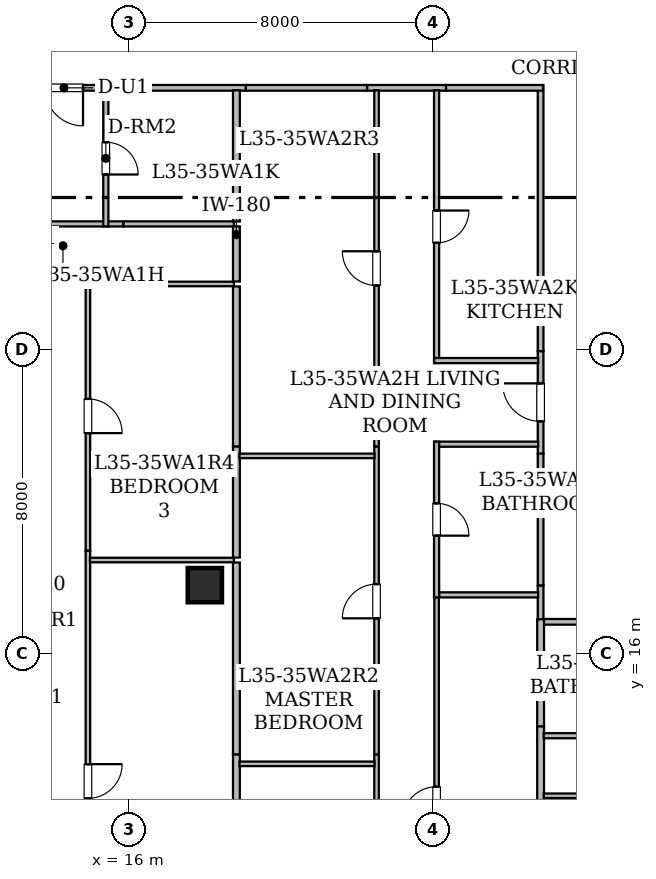
"""IFC4 building model, lengths in metres.
Left out: names, types, materials, properties, quantities, classifications, styles, units other than length and angle.
Written with IfcOpenShell. Run it as: python <this file> out.ifc"""

import sys

from ifc_helpers import new_model, si_unit, direction, frame, frame_2d, origin, origin_2d, place, context, subcontext, project, spatial, rectangle, hollow_rectangle, extrude, element, fill, save


model = new_model("IFC4")
c1 = context("Model", 3, precision=1e-05, world=origin(), true_north=direction((0.0, 1.0)))
c2 = subcontext(c1, "Body", "Model", "MODEL_VIEW")
j1 = project(units=[si_unit("LENGTHUNIT", "METRE"), si_unit("PLANEANGLEUNIT", "RADIAN")], contexts=[c1])
p1 = place(None, origin())
s1 = spatial("IfcSite", under=j1, at=p1, CompositionType="ELEMENT")
p2 = place(p1, origin())
s2 = spatial("IfcBuilding", under=s1, at=p2, CompositionType="ELEMENT")
p3 = place(p2, frame((0.0, 0.0, 138.4)))
s3 = spatial("IfcBuildingStorey", under=s2, at=p3, CompositionType="ELEMENT", Elevation=138.4)
p4 = place(p3, frame((18.0, 17.8, 0.0), z_axis=(0.0, 0.0, 1.0), x_axis=(1.0, 0.0, 0.0)))
e1 = element("IfcColumn", 1, at=p4, inside=s3, PredefinedType="COLUMN", context=c2, shape_type="SweptSolid", body=[
    extrude(hollow_rectangle(XDim=0.9, YDim=0.9, WallThickness=0.045, at=origin_2d()), origin(), (0.0, 0.0, 1.0), 3.65),
])
p5 = place(p3, frame((15.643, 30.885, 0.0), z_axis=(0.0, 0.0, 1.0), x_axis=(-1.0, 0.0, 0.0)))
e2 = element("IfcWall", 2, at=p5, inside=s3, PredefinedType="STANDARD", context=c2, shape_type="SweptSolid", body=[
    extrude(rectangle(XDim=2.698, YDim=0.15, at=frame_2d((1.349, 0.0))), origin(), (0.0, 0.0, 1.0), 3.43),
])
p6 = place(p5, frame((0.849, 0.0, 0.0)))
e3 = element("IfcOpeningElement", 3, at=p6, cuts=e2, PredefinedType="OPENING", context=c2, shape_type="SweptSolid", body=[
    extrude(rectangle(XDim=1.0, YDim=2.15, at=frame_2d((0.5, 1.075))), frame((0.0, 0.085, 0.0), z_axis=(0.0, -1.0, 0.0), x_axis=(1.0, 0.0, 0.0)), (0.0, 0.0, 1.0), 0.17),
])
p7 = place(p3, frame((19.08, 30.885, 0.0), z_axis=(0.0, 0.0, 1.0), x_axis=(-1.0, 0.0, 0.0)))
e4 = element("IfcWall", 4, at=p7, inside=s3, PredefinedType="STANDARD", context=c2, shape_type="SweptSolid", body=[
    extrude(rectangle(XDim=3.437, YDim=0.15, at=frame_2d((1.719, 0.0))), origin(), (0.0, 0.0, 1.0), 2.647),
])
p8 = place(p3, frame((26.835, 16.9, 0.0), z_axis=(0.0, 0.0, 1.0), x_axis=(0.0, 1.0, 0.0)))
e5 = element("IfcWall", 5, at=p8, inside=s3, PredefinedType="STANDARD", context=c2, shape_type="SweptSolid", body=[
    extrude(rectangle(XDim=0.893, YDim=0.15, at=frame_2d((0.447, 0.0))), origin(), (0.0, 0.0, 1.0), 3.43),
])
p9 = place(p3, frame((26.835, 21.26, 0.0), z_axis=(0.0, 0.0, 1.0), x_axis=(0.0, 1.0, 0.0)))
e6 = element("IfcWall", 6, at=p9, inside=s3, PredefinedType="STANDARD", context=c2, shape_type="SweptSolid", body=[
    extrude(rectangle(XDim=2.698, YDim=0.15, at=frame_2d((1.349, 0.0))), origin(), (0.0, 0.0, 1.0), 3.43),
])
p10 = place(p9, frame((0.849, 0.0, 0.0)))
e7 = element("IfcOpeningElement", 7, at=p10, cuts=e6, PredefinedType="OPENING", context=c2, shape_type="SweptSolid", body=[
    extrude(rectangle(XDim=1.0, YDim=2.15, at=frame_2d((0.5, 1.075))), frame((0.0, 0.085, 0.0), z_axis=(0.0, -1.0, 0.0), x_axis=(1.0, 0.0, 0.0)), (0.0, 0.0, 1.0), 0.17),
])
p11 = place(p3, frame((24.347, 30.885, 0.0), z_axis=(0.0, 0.0, 1.0), x_axis=(-1.0, 0.0, 0.0)))
e8 = element("IfcWall", 8, at=p11, inside=s3, PredefinedType="STANDARD", context=c2, shape_type="SweptSolid", body=[
    extrude(rectangle(XDim=2.079, YDim=0.15, at=frame_2d((1.04, 0.0))), origin(), (0.0, 0.0, 1.0), 3.43),
])
p12 = place(p3, frame((26.835, 17.793, 0.0), z_axis=(0.0, 0.0, 1.0), x_axis=(0.0, 1.0, 0.0)))
e9 = element("IfcWall", 9, at=p12, inside=s3, PredefinedType="STANDARD", context=c2, shape_type="SweptSolid", body=[
    extrude(rectangle(XDim=3.467, YDim=0.15, at=frame_2d((1.733, 0.0))), origin(), (0.0, 0.0, 1.0), 2.647),
])
p13 = place(p3, frame((26.835, 23.958, 0.0), z_axis=(0.0, 0.0, 1.0), x_axis=(0.0, 1.0, 0.0)))
e10 = element("IfcWall", 10, at=p13, inside=s3, PredefinedType="STANDARD", context=c2, shape_type="SweptSolid", body=[
    extrude(rectangle(XDim=6.992, YDim=0.15, at=frame_2d((3.496, 0.0))), origin(), (0.0, 0.0, 1.0), 3.013),
])
p14 = place(p3, frame((26.898, 30.885, 0.0), z_axis=(0.0, 0.0, 1.0), x_axis=(-1.0, 0.0, 0.0)))
e11 = element("IfcWall", 11, at=p14, inside=s3, PredefinedType="STANDARD", context=c2, shape_type="SweptSolid", body=[
    extrude(rectangle(XDim=2.551, YDim=0.15, at=frame_2d((1.275, 0.0))), origin(), (0.0, 0.0, 1.0), 3.43),
])
p15 = place(p3, frame((22.268, 30.885, 0.0), z_axis=(0.0, 0.0, 1.0), x_axis=(-1.0, 0.0, 0.0)))
e12 = element("IfcWall", 12, at=p15, inside=s3, PredefinedType="STANDARD", context=c2, shape_type="SweptSolid", body=[
    extrude(rectangle(XDim=3.188, YDim=0.15, at=frame_2d((1.594, 0.0))), origin(), (0.0, 0.0, 1.0), 3.43),
])
p16 = place(p3, frame((31.601, 16.835, 0.0), z_axis=(0.0, 0.0, 1.0), x_axis=(-1.0, 0.0, 0.0)))
e13 = element("IfcWall", 13, at=p16, inside=s3, PredefinedType="STANDARD", context=c2, shape_type="SweptSolid", body=[
    extrude(rectangle(XDim=4.701, YDim=0.15, at=frame_2d((2.351, 0.0))), origin(), (0.0, 0.0, 1.0), 2.647),
])
p17 = place(p3, frame((11.429, 27.305, 0.0), z_axis=(0.0, 0.0, 1.0), x_axis=(1.0, 0.0, 0.0)))
e14 = element("IfcWall", 14, at=p17, inside=s3, PredefinedType="PARTITIONING", context=c2, shape_type="SweptSolid", body=[
    extrude(rectangle(XDim=4.43, YDim=0.135, at=frame_2d((2.215, 0.0))), origin(), (0.0, 0.0, 1.0), 2.876),
])
p18 = place(p3, frame((15.394, 30.82, 0.0), z_axis=(0.0, 0.0, 1.0), x_axis=(0.0, -1.0, 0.0)))
e15 = element("IfcWall", 15, at=p18, inside=s3, PredefinedType="PARTITIONING", context=c2, shape_type="SweptSolid", body=[
    extrude(rectangle(XDim=3.58, YDim=0.135, at=frame_2d((1.79, 0.0))), origin(), (0.0, 0.0, 1.0), 3.43),
])
p19 = place(p18, frame((1.365, 0.0, 0.0)))
e16 = element("IfcOpeningElement", 16, at=p19, cuts=e15, PredefinedType="OPENING", context=c2, shape_type="SweptSolid", body=[
    extrude(rectangle(XDim=0.85, YDim=2.1, at=frame_2d((0.425, 1.05))), frame((0.0, 0.077, 0.0), z_axis=(0.0, -1.0, 0.0), x_axis=(1.0, 0.0, 0.0)), (0.0, 0.0, 1.0), 0.155),
])
p20 = place(p3, frame((15.859, 27.305, 0.0), z_axis=(0.0, 0.0, 1.0), x_axis=(1.0, 0.0, 0.0)))
e17 = element("IfcWall", 17, at=p20, inside=s3, PredefinedType="PARTITIONING", context=c2, shape_type="SweptSolid", body=[
    extrude(rectangle(XDim=2.906, YDim=0.135, at=frame_2d((1.453, 0.0))), origin(), (0.0, 0.0, 1.0), 2.647),
])
p21 = place(p3, frame((14.923, 18.71, 0.0), z_axis=(0.0, 0.0, 1.0), x_axis=(0.0, -1.0, 0.0)))
e18 = element("IfcWall", 18, at=p21, inside=s3, PredefinedType="PARTITIONING", context=c2, shape_type="SweptSolid", body=[
    extrude(rectangle(XDim=12.098, YDim=0.12, at=frame_2d((6.049, 0.0))), origin(), (0.0, 0.0, 1.0), 2.647),
])
p22 = place(p21, frame((5.62, 0.0, 0.0)))
e19 = element("IfcOpeningElement", 19, at=p22, cuts=e18, PredefinedType="OPENING", context=c2, shape_type="SweptSolid", body=[
    extrude(rectangle(XDim=0.9, YDim=2.1, at=frame_2d((0.45, 1.05))), frame((0.0, 0.07, 0.0), z_axis=(0.0, -1.0, 0.0), x_axis=(1.0, 0.0, 0.0)), (0.0, 0.0, 1.0), 0.14),
])
p23 = place(p3, frame((18.765, 25.725, 0.0), z_axis=(0.0, 0.0, 1.0), x_axis=(-1.0, 0.0, 0.0)))
e20 = element("IfcWall", 20, at=p23, inside=s3, PredefinedType="PARTITIONING", context=c2, shape_type="SweptSolid", body=[
    extrude(rectangle(XDim=3.907, YDim=0.12, at=frame_2d((1.954, 0.0))), origin(), (0.0, 0.0, 1.0), 2.647),
])
p24 = place(p3, frame((14.923, 25.79, 0.0), z_axis=(0.0, 0.0, 1.0), x_axis=(0.0, -1.0, 0.0)))
e21 = element("IfcWall", 21, at=p24, inside=s3, PredefinedType="PARTITIONING", context=c2, shape_type="SweptSolid", body=[
    extrude(rectangle(XDim=7.08, YDim=0.12, at=frame_2d((3.54, 0.0))), origin(), (0.0, 0.0, 1.0), 3.43),
])
p25 = place(p24, frame((3.09, 0.0, 0.0)))
e22 = element("IfcOpeningElement", 22, at=p25, cuts=e21, PredefinedType="OPENING", context=c2, shape_type="SweptSolid", body=[
    extrude(rectangle(XDim=0.9, YDim=2.1, at=frame_2d((0.45, 1.05))), frame((0.0, 0.07, 0.0), z_axis=(0.0, -1.0, 0.0), x_axis=(1.0, 0.0, 0.0)), (0.0, 0.0, 1.0), 0.14),
])
p26 = place(p3, frame((18.83, 27.24, 0.0), z_axis=(0.0, 0.0, 1.0), x_axis=(0.0, -1.0, 0.0)))
e23 = element("IfcWall", 23, at=p26, inside=s3, PredefinedType="STANDARD", context=c2, shape_type="SweptSolid", body=[
    extrude(rectangle(XDim=1.45, YDim=0.18, at=frame_2d((0.725, 0.0))), origin(), (0.0, 0.0, 1.0), 3.43),
])
p27 = place(p3, frame((18.83, 30.82, 0.0), z_axis=(0.0, 0.0, 1.0), x_axis=(0.0, -1.0, 0.0)))
e24 = element("IfcWall", 24, at=p27, inside=s3, PredefinedType="STANDARD", context=c2, shape_type="SweptSolid", body=[
    extrude(rectangle(XDim=3.45, YDim=0.18, at=frame_2d((1.725, 0.0))), origin(), (0.0, 0.0, 1.0), 3.013),
])
p28 = place(p3, frame((14.977, 18.461, 0.0), z_axis=(0.0, 0.0, 1.0), x_axis=(1.0, 0.0, 0.0)))
e25 = element("IfcWall", 25, at=p28, inside=s3, PredefinedType="PARTITIONING", context=c2, shape_type="SweptSolid", body=[
    extrude(rectangle(XDim=3.788, YDim=0.12, at=frame_2d((1.894, 0.0))), origin(), (0.0, 0.0, 1.0), 2.647),
])
p29 = place(p3, frame((18.83, 13.347, 0.0), z_axis=(0.0, 0.0, 1.0), x_axis=(0.0, -1.0, 0.0)))
e26 = element("IfcWall", 26, at=p29, inside=s3, PredefinedType="STANDARD", context=c2, shape_type="SweptSolid", body=[
    extrude(rectangle(XDim=6.735, YDim=0.18, at=frame_2d((3.367, 0.0))), origin(), (0.0, 0.0, 1.0), 2.876),
])
p30 = place(p3, frame((18.83, 18.396, 0.0), z_axis=(0.0, 0.0, 1.0), x_axis=(0.0, -1.0, 0.0)))
e27 = element("IfcWall", 27, at=p30, inside=s3, PredefinedType="STANDARD", context=c2, shape_type="SweptSolid", body=[
    extrude(rectangle(XDim=5.049, YDim=0.18, at=frame_2d((2.524, 0.0))), origin(), (0.0, 0.0, 1.0), 2.647),
])
p31 = place(p3, frame((18.83, 21.451, 0.0), z_axis=(0.0, 0.0, 1.0), x_axis=(0.0, -1.0, 0.0)))
e28 = element("IfcWall", 28, at=p31, inside=s3, PredefinedType="STANDARD", context=c2, shape_type="SweptSolid", body=[
    extrude(rectangle(XDim=2.925, YDim=0.18, at=frame_2d((1.462, 0.0))), origin(), (0.0, 0.0, 1.0), 3.43),
])
p32 = place(p3, frame((18.83, 25.66, 0.0), z_axis=(0.0, 0.0, 1.0), x_axis=(0.0, -1.0, 0.0)))
e29 = element("IfcWall", 29, at=p32, inside=s3, PredefinedType="STANDARD", context=c2, shape_type="SweptSolid", body=[
    extrude(rectangle(XDim=4.209, YDim=0.18, at=frame_2d((2.104, 0.0))), origin(), (0.0, 0.0, 1.0), 3.43),
])
p33 = place(p3, frame((24.098, 6.612, 0.0), z_axis=(0.0, 0.0, 1.0), x_axis=(0.0, 1.0, 0.0)))
e30 = element("IfcWall", 30, at=p33, inside=s3, PredefinedType="PARTITIONING", context=c2, shape_type="SweptSolid", body=[
    extrude(rectangle(XDim=10.867, YDim=0.12, at=frame_2d((5.434, 0.0))), origin(), (0.0, 0.0, 1.0), 2.876),
])
p34 = place(p33, frame((4.984, 0.0, 0.0)))
e31 = element("IfcOpeningElement", 31, at=p34, cuts=e30, PredefinedType="OPENING", context=c2, shape_type="SweptSolid", body=[
    extrude(rectangle(XDim=0.9, YDim=2.1, at=frame_2d((0.45, 1.05))), frame((0.0, 0.07, 0.0), z_axis=(0.0, -1.0, 0.0), x_axis=(1.0, 0.0, 0.0)), (0.0, 0.0, 1.0), 0.14),
])
p35 = place(p3, frame((24.163, 17.544, 0.0), z_axis=(0.0, 0.0, 1.0), x_axis=(1.0, 0.0, 0.0)))
e32 = element("IfcWall", 32, at=p35, inside=s3, PredefinedType="PARTITIONING", context=c2, shape_type="SweptSolid", body=[
    extrude(rectangle(XDim=2.607, YDim=0.135, at=frame_2d((1.303, 0.0))), origin(), (0.0, 0.0, 1.0), 3.43),
])
p36 = place(p3, frame((26.835, 14.087, 0.0), z_axis=(0.0, 0.0, 1.0), x_axis=(0.0, -1.0, 0.0)))
e33 = element("IfcWall", 33, at=p36, inside=s3, PredefinedType="STANDARD", context=c2, shape_type="SweptSolid", body=[
    extrude(rectangle(XDim=2.078, YDim=0.18, at=frame_2d((1.039, 0.0))), origin(), (0.0, 0.0, 1.0), 3.43),
])
p37 = place(p3, frame((26.835, 16.9, 0.0), z_axis=(0.0, 0.0, 1.0), x_axis=(0.0, -1.0, 0.0)))
e34 = element("IfcWall", 34, at=p37, inside=s3, PredefinedType="STANDARD", context=c2, shape_type="SweptSolid", body=[
    extrude(rectangle(XDim=2.813, YDim=0.18, at=frame_2d((1.406, 0.0))), origin(), (0.0, 0.0, 1.0), 3.43),
])
p38 = place(p3, frame((26.77, 21.509, 0.0), z_axis=(0.0, 0.0, 1.0), x_axis=(-1.0, 0.0, 0.0)))
e35 = element("IfcWall", 35, at=p38, inside=s3, PredefinedType="PARTITIONING", context=c2, shape_type="SweptSolid", body=[
    extrude(rectangle(XDim=2.737, YDim=0.135, at=frame_2d((1.369, 0.0))), origin(), (0.0, 0.0, 1.0), 3.43),
])
p39 = place(p3, frame((24.098, 21.574, 0.0), z_axis=(0.0, 0.0, 1.0), x_axis=(0.0, -1.0, 0.0)))
e36 = element("IfcWall", 36, at=p39, inside=s3, PredefinedType="PARTITIONING", context=c2, shape_type="SweptSolid", body=[
    extrude(rectangle(XDim=4.095, YDim=0.135, at=frame_2d((2.047, 0.0))), origin(), (0.0, 0.0, 1.0), 2.647),
])
p40 = place(p39, frame((1.622, 0.0, 0.0)))
e37 = element("IfcOpeningElement", 37, at=p40, cuts=e36, PredefinedType="OPENING", context=c2, shape_type="SweptSolid", body=[
    extrude(rectangle(XDim=0.85, YDim=2.1, at=frame_2d((0.425, 1.05))), frame((0.0, 0.077, 0.0), z_axis=(0.0, -1.0, 0.0), x_axis=(1.0, 0.0, 0.0)), (0.0, 0.0, 1.0), 0.155),
])
p41 = place(p3, frame((24.098, 30.82, 0.0), z_axis=(0.0, 0.0, 1.0), x_axis=(0.0, -1.0, 0.0)))
e38 = element("IfcWall", 38, at=p41, inside=s3, PredefinedType="PARTITIONING", context=c2, shape_type="SweptSolid", body=[
    extrude(rectangle(XDim=7.176, YDim=0.135, at=frame_2d((3.588, 0.0))), origin(), (0.0, 0.0, 1.0), 3.013),
])
p42 = place(p41, frame((3.163, 0.0, 0.0)))
e39 = element("IfcOpeningElement", 39, at=p42, cuts=e38, PredefinedType="OPENING", context=c2, shape_type="SweptSolid", body=[
    extrude(rectangle(XDim=0.85, YDim=2.1, at=frame_2d((0.425, 1.05))), frame((0.0, 0.077, 0.0), z_axis=(0.0, -1.0, 0.0), x_axis=(1.0, 0.0, 0.0)), (0.0, 0.0, 1.0), 0.155),
])
p43 = place(p3, frame((24.033, 23.709, 0.0), z_axis=(0.0, 0.0, 1.0), x_axis=(1.0, 0.0, 0.0)))
e40 = element("IfcWall", 40, at=p43, inside=s3, PredefinedType="PARTITIONING", context=c2, shape_type="SweptSolid", body=[
    extrude(rectangle(XDim=2.737, YDim=0.135, at=frame_2d((1.369, 0.0))), origin(), (0.0, 0.0, 1.0), 3.43),
])
p44 = place(p3, frame((22.518, 6.612, 0.0), z_axis=(0.0, 0.0, 1.0), x_axis=(0.0, 1.0, 0.0)))
e41 = element("IfcWall", 41, at=p44, inside=s3, PredefinedType="PARTITIONING", context=c2, shape_type="SweptSolid", body=[
    extrude(rectangle(XDim=6.735, YDim=0.12, at=frame_2d((3.367, 0.0))), origin(), (0.0, 0.0, 1.0), 2.876),
])
p45 = place(p44, frame((2.896, 0.0, 0.0)))
e42 = element("IfcOpeningElement", 42, at=p45, cuts=e41, PredefinedType="OPENING", context=c2, shape_type="SweptSolid", body=[
    extrude(rectangle(XDim=0.9, YDim=2.1, at=frame_2d((0.45, 1.05))), frame((0.0, 0.07, 0.0), z_axis=(0.0, -1.0, 0.0), x_axis=(1.0, 0.0, 0.0)), (0.0, 0.0, 1.0), 0.14),
])
p46 = place(p3, frame((22.518, 13.347, 0.0), z_axis=(0.0, 0.0, 1.0), x_axis=(0.0, 1.0, 0.0)))
e43 = element("IfcWall", 43, at=p46, inside=s3, PredefinedType="PARTITIONING", context=c2, shape_type="SweptSolid", body=[
    extrude(rectangle(XDim=8.104, YDim=0.12, at=frame_2d((4.052, 0.0))), origin(), (0.0, 0.0, 1.0), 2.647),
])
p47 = place(p46, frame((3.58, 0.0, 0.0)))
e44 = element("IfcOpeningElement", 44, at=p47, cuts=e43, PredefinedType="OPENING", context=c2, shape_type="SweptSolid", body=[
    extrude(rectangle(XDim=0.9, YDim=2.1, at=frame_2d((0.45, 1.05))), frame((0.0, 0.07, 0.0), z_axis=(0.0, -1.0, 0.0), x_axis=(1.0, 0.0, 0.0)), (0.0, 0.0, 1.0), 0.14),
])
p48 = place(p3, frame((22.518, 21.451, 0.0), z_axis=(0.0, 0.0, 1.0), x_axis=(0.0, 1.0, 0.0)))
e45 = element("IfcWall", 45, at=p48, inside=s3, PredefinedType="PARTITIONING", context=c2, shape_type="SweptSolid", body=[
    extrude(rectangle(XDim=9.369, YDim=0.12, at=frame_2d((4.685, 0.0))), origin(), (0.0, 0.0, 1.0), 3.013),
])
p49 = place(p48, frame((4.234, 0.0, 0.0)))
e46 = element("IfcOpeningElement", 46, at=p49, cuts=e45, PredefinedType="OPENING", context=c2, shape_type="SweptSolid", body=[
    extrude(rectangle(XDim=0.9, YDim=2.1, at=frame_2d((0.45, 1.05))), frame((0.0, 0.07, 0.0), z_axis=(0.0, -1.0, 0.0), x_axis=(1.0, 0.0, 0.0)), (0.0, 0.0, 1.0), 0.14),
])
for number, where, z_axis, x_axis in (
    (47, (18.912, 13.098, 0.0), (0.0, 0.0, 1.0), (1.0, 0.0, 0.0)),
    (48, (18.912, 21.201, 0.0), (0.0, 0.0, 1.0), (1.0, 0.0, 0.0)),
):
    element("IfcWall", number, at=place(p3, frame(where, z_axis=z_axis, x_axis=x_axis)), inside=s3, PredefinedType="PARTITIONING", context=c2, shape_type="SweptSolid", body=[
        extrude(rectangle(XDim=3.552, YDim=0.12, at=frame_2d((1.776, 0.0))), origin(), (0.0, 0.0, 1.0), 3.43),
    ])
p50 = place(p3, frame((26.917, 13.838, 0.0), z_axis=(0.0, 0.0, 1.0), x_axis=(1.0, 0.0, 0.0)))
e49 = element("IfcWall", 49, at=p50, inside=s3, PredefinedType="PARTITIONING", context=c2, shape_type="SweptSolid", body=[
    extrude(rectangle(XDim=4.998, YDim=0.135, at=frame_2d((2.499, 0.0))), origin(), (0.0, 0.0, 1.0), 2.647),
])
p51 = place(p50, frame((2.074, 0.0, 0.0)))
e50 = element("IfcOpeningElement", 50, at=p51, cuts=e49, PredefinedType="OPENING", context=c2, shape_type="SweptSolid", body=[
    extrude(rectangle(XDim=0.85, YDim=2.1, at=frame_2d((0.425, 1.05))), frame((0.0, 0.077, 0.0), z_axis=(0.0, -1.0, 0.0), x_axis=(1.0, 0.0, 0.0)), (0.0, 0.0, 1.0), 0.155),
])
p52 = place(p3, frame((33.734, 12.258, 0.0), z_axis=(0.0, 0.0, 1.0), x_axis=(-1.0, 0.0, 0.0)))
e51 = element("IfcWall", 51, at=p52, inside=s3, PredefinedType="PARTITIONING", context=c2, shape_type="SweptSolid", body=[
    extrude(rectangle(XDim=6.817, YDim=0.12, at=frame_2d((3.408, 0.0))), origin(), (0.0, 0.0, 1.0), 2.647),
])
p53 = place(p52, frame((2.98, 0.0, 0.0)))
e52 = element("IfcOpeningElement", 52, at=p53, cuts=e51, PredefinedType="OPENING", context=c2, shape_type="SweptSolid", body=[
    extrude(rectangle(XDim=0.9, YDim=2.1, at=frame_2d((0.45, 1.05))), frame((0.0, 0.07, 0.0), z_axis=(0.0, -1.0, 0.0), x_axis=(1.0, 0.0, 0.0)), (0.0, 0.0, 1.0), 0.14),
])
p54 = place(p6, origin())
e53 = element("IfcDoor", 53, at=p54, inside=s3, OperationType="SINGLE_SWING_LEFT", PredefinedType="DOOR", context=c2, shape_type="SweptSolid", body=[
    extrude(rectangle(XDim=1.0, YDim=2.15, at=frame_2d((0.5, 1.075))), frame((0.0, 0.025, 0.0), z_axis=(0.0, -1.0, 0.0), x_axis=(1.0, 0.0, 0.0)), (0.0, 0.0, 1.0), 0.05),
])
fill(e3, e53)
p55 = place(p10, origin())
e54 = element("IfcDoor", 54, at=p55, inside=s3, OperationType="SINGLE_SWING_RIGHT", PredefinedType="DOOR", context=c2, shape_type="SweptSolid", body=[
    extrude(rectangle(XDim=1.0, YDim=2.15, at=frame_2d((0.5, 1.075))), frame((0.0, 0.025, 0.0), z_axis=(0.0, -1.0, 0.0), x_axis=(1.0, 0.0, 0.0)), (0.0, 0.0, 1.0), 0.05),
])
fill(e7, e54)
p56 = place(p19, origin())
e55 = element("IfcDoor", 55, at=p56, inside=s3, OperationType="SINGLE_SWING_RIGHT", PredefinedType="DOOR", context=c2, shape_type="SweptSolid", body=[
    extrude(rectangle(XDim=0.85, YDim=2.1, at=frame_2d((0.425, 1.05))), frame((0.0, 0.025, 0.0), z_axis=(0.0, -1.0, 0.0), x_axis=(1.0, 0.0, 0.0)), (0.0, 0.0, 1.0), 0.05),
])
fill(e16, e55)
p57 = place(p22, origin())
e56 = element("IfcDoor", 56, at=p57, inside=s3, OperationType="SINGLE_SWING_LEFT", PredefinedType="DOOR", context=c2, shape_type="SweptSolid", body=[
    extrude(rectangle(XDim=0.9, YDim=2.1, at=frame_2d((0.45, 1.05))), frame((0.0, 0.025, 0.0), z_axis=(0.0, -1.0, 0.0), x_axis=(1.0, 0.0, 0.0)), (0.0, 0.0, 1.0), 0.05),
])
fill(e19, e56)
p58 = place(p25, origin())
e57 = element("IfcDoor", 57, at=p58, inside=s3, OperationType="SINGLE_SWING_RIGHT", PredefinedType="DOOR", context=c2, shape_type="SweptSolid", body=[
    extrude(rectangle(XDim=0.9, YDim=2.1, at=frame_2d((0.45, 1.05))), frame((0.0, 0.025, 0.0), z_axis=(0.0, -1.0, 0.0), x_axis=(1.0, 0.0, 0.0)), (0.0, 0.0, 1.0), 0.05),
])
fill(e22, e57)
p59 = place(p34, origin())
e58 = element("IfcDoor", 58, at=p59, inside=s3, OperationType="SINGLE_SWING_LEFT", PredefinedType="DOOR", context=c2, shape_type="SweptSolid", body=[
    extrude(rectangle(XDim=0.9, YDim=2.1, at=frame_2d((0.45, 1.05))), frame((0.0, 0.025, 0.0), z_axis=(0.0, -1.0, 0.0), x_axis=(1.0, 0.0, 0.0)), (0.0, 0.0, 1.0), 0.05),
])
fill(e31, e58)
p60 = place(p40, origin())
e59 = element("IfcDoor", 59, at=p60, inside=s3, OperationType="SINGLE_SWING_RIGHT", PredefinedType="DOOR", context=c2, shape_type="SweptSolid", body=[
    extrude(rectangle(XDim=0.85, YDim=2.1, at=frame_2d((0.425, 1.05))), frame((0.0, 0.025, 0.0), z_axis=(0.0, -1.0, 0.0), x_axis=(1.0, 0.0, 0.0)), (0.0, 0.0, 1.0), 0.05),
])
fill(e37, e59)
p61 = place(p42, origin())
e60 = element("IfcDoor", 60, at=p61, inside=s3, OperationType="SINGLE_SWING_LEFT", PredefinedType="DOOR", context=c2, shape_type="SweptSolid", body=[
    extrude(rectangle(XDim=0.85, YDim=2.1, at=frame_2d((0.425, 1.05))), frame((0.0, 0.025, 0.0), z_axis=(0.0, -1.0, 0.0), x_axis=(1.0, 0.0, 0.0)), (0.0, 0.0, 1.0), 0.05),
])
fill(e39, e60)
p62 = place(p47, origin())
e61 = element("IfcDoor", 61, at=p62, inside=s3, OperationType="SINGLE_SWING_LEFT", PredefinedType="DOOR", context=c2, shape_type="SweptSolid", body=[
    extrude(rectangle(XDim=0.9, YDim=2.1, at=frame_2d((0.45, 1.05))), frame((0.0, 0.025, 0.0), z_axis=(0.0, -1.0, 0.0), x_axis=(1.0, 0.0, 0.0)), (0.0, 0.0, 1.0), 0.05),
])
fill(e44, e61)
p63 = place(p49, origin())
e62 = element("IfcDoor", 62, at=p63, inside=s3, OperationType="SINGLE_SWING_RIGHT", PredefinedType="DOOR", context=c2, shape_type="SweptSolid", body=[
    extrude(rectangle(XDim=0.9, YDim=2.1, at=frame_2d((0.45, 1.05))), frame((0.0, 0.025, 0.0), z_axis=(0.0, -1.0, 0.0), x_axis=(1.0, 0.0, 0.0)), (0.0, 0.0, 1.0), 0.05),
])
fill(e46, e62)
save(model, sys.argv[1])
